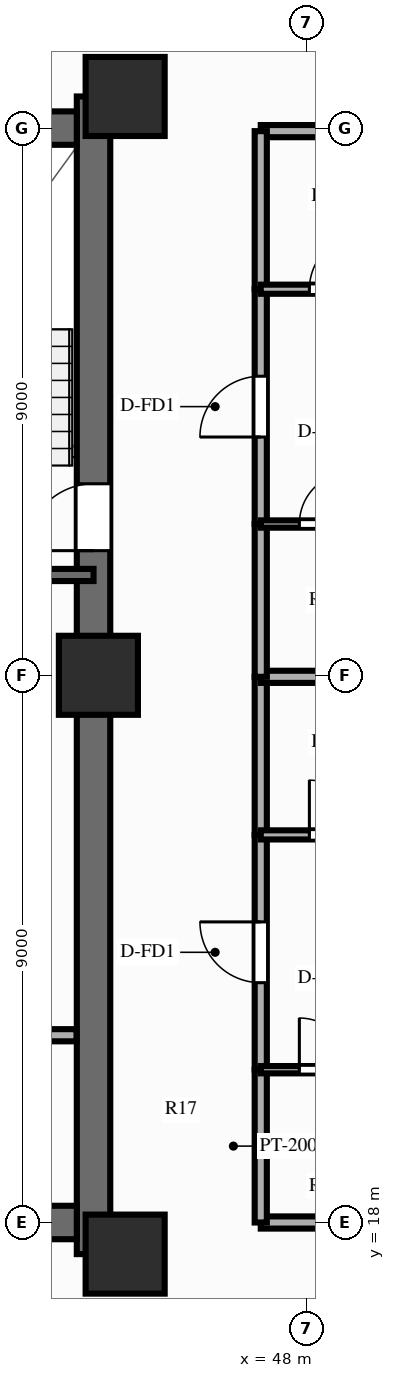
"""IFC4 building model, lengths in metres.
Left out: names, types, materials, properties, quantities, classifications, styles, units other than length and angle.
Written with IfcOpenShell. Run it as: python <this file> out.ifc"""

import sys

from ifc_helpers import new_model, si_unit, direction, frame, frame_2d, origin, origin_2d, place, context, subcontext, project, spatial, rectangle, extrude, source, transform, mapped, element, fill, save


model = new_model("IFC4")
c1 = context("Model", 3, precision=1e-05, world=origin(), true_north=direction((0.0, 1.0)))
c2 = subcontext(c1, "Body", "Model", "MODEL_VIEW")
j1 = project(units=[si_unit("LENGTHUNIT", "METRE"), si_unit("PLANEANGLEUNIT", "RADIAN")], contexts=[c1])
p1 = place(None, origin())
s1 = spatial("IfcSite", under=j1, at=p1, CompositionType="ELEMENT")
p2 = place(p1, origin())
s2 = spatial("IfcBuilding", under=s1, at=p2, CompositionType="ELEMENT")
p3 = place(p2, frame((0.0, 0.0, 89.85)))
s3 = spatial("IfcBuildingStorey", under=s2, at=p3, CompositionType="ELEMENT", Elevation=89.85)
p4 = place(p3, frame((44.5, 17.48, 0.0), z_axis=(0.0, 0.0, 1.0), x_axis=(0.0, 1.0, 0.0)))
e1 = element("IfcWall", 1, at=p4, inside=s3, PredefinedType="SHEAR", context=c2, shape_type="SweptSolid", body=[
    extrude(rectangle(XDim=19.04, YDim=0.55, at=frame_2d((9.52, 0.0))), origin(), (0.0, 0.0, 1.0), 3.0),
])
p5 = place(p4, frame((12.67, 0.0, 0.0), z_axis=(0.0, 0.0, 1.0), x_axis=(-1.0, 0.0, 0.0)))
e2 = element("IfcOpeningElement", 2, at=p5, cuts=e1, PredefinedType="OPENING", context=c2, shape_type="SweptSolid", body=[
    extrude(rectangle(XDim=1.1, YDim=2.15, at=frame_2d((0.55, 1.075))), frame((0.0, 0.287, 0.0), z_axis=(0.0, -1.0, 0.0), x_axis=(1.0, 0.0, 0.0)), (0.0, 0.0, 1.0), 0.574),
])
p6 = place(p3, frame((31.775, 18.0, 0.0), z_axis=(0.0, 0.0, 1.0), x_axis=(1.0, 0.0, 0.0)))
e3 = element("IfcWall", 3, at=p6, inside=s3, PredefinedType="SHEAR", context=c2, shape_type="SweptSolid", body=[
    extrude(rectangle(XDim=12.45, YDim=0.55, at=frame_2d((6.225, 0.0))), origin(), (0.0, 0.0, 1.0), 3.0),
])
p7 = place(p3, frame((31.775, 36.0, 0.0), z_axis=(0.0, 0.0, 1.0), x_axis=(1.0, 0.0, 0.0)))
e4 = element("IfcWall", 4, at=p7, inside=s3, PredefinedType="SHEAR", context=c2, shape_type="SweptSolid", body=[
    extrude(rectangle(XDim=12.45, YDim=0.55, at=frame_2d((6.225, 0.0))), origin(), (0.0, 0.0, 1.0), 3.0),
])
p8 = place(p7, frame((5.175, 0.0, 0.0), z_axis=(0.0, 0.0, 1.0), x_axis=(-1.0, 0.0, 0.0)))
e5 = element("IfcOpeningElement", 5, at=p8, cuts=e4, PredefinedType="OPENING", context=c2, shape_type="SweptSolid", body=[
    extrude(rectangle(XDim=1.4, YDim=2.15, at=frame_2d((0.7, 1.075))), frame((0.0, 0.287, 0.0), z_axis=(0.0, -1.0, 0.0), x_axis=(1.0, 0.0, 0.0)), (0.0, 0.0, 1.0), 0.574),
])
m1 = source(origin(), c2, "Body", "SweptSolid", [
    extrude(rectangle(XDim=1.3, YDim=1.3, at=origin_2d()), origin(), (0.0, 0.0, 1.0), 3.0),
])
for number, where, z_axis, x_axis in (
    (6, (45.02, 17.48, 0.0), (0.0, 0.0, 1.0), (1.0, 0.0, 0.0)),
    (7, (45.02, 36.52, 0.0), (0.0, 0.0, 1.0), (1.0, 0.0, 0.0)),
    (8, (44.58, 27.0, 0.0), (0.0, 0.0, 1.0), (1.0, 0.0, 0.0)),
):
    element("IfcColumn", number, at=place(p3, frame(where, z_axis=z_axis, x_axis=x_axis)), inside=s3, PredefinedType="COLUMN", context=c2, shape_type="MappedRepresentation", body=[
        mapped(m1, transform((0.0, 0.0, 0.0), scale=1.0)),
    ])
p9 = place(p3, frame((42.88, 21.08, 0.0), z_axis=(0.0, 0.0, 1.0), x_axis=(1.0, 0.0, 0.0)))
e9 = element("IfcWall", 9, at=p9, inside=s3, PredefinedType="PARTITIONING", context=c2, shape_type="SweptSolid", body=[
    extrude(rectangle(XDim=1.34, YDim=0.2, at=frame_2d((0.67, 0.0))), origin(), (0.0, 0.0, 1.0), 2.79),
])
p10 = place(p3, frame((40.57, 28.65, 0.0), z_axis=(0.0, 0.0, 1.0), x_axis=(1.0, 0.0, 0.0)))
e10 = element("IfcWall", 10, at=p10, inside=s3, PredefinedType="SOLIDWALL", context=c2, shape_type="SweptSolid", body=[
    extrude(rectangle(XDim=3.93, YDim=0.2, at=frame_2d((1.965, 0.0))), origin(), (0.0, 0.0, 1.0), 2.79),
])
for number, where, z_axis, x_axis in (
    (11, (47.25, 18.0, 0.0), (0.0, 0.0, 1.0), (1.0, 0.0, 0.0)),
    (12, (47.25, 35.95, 0.0), (0.0, 0.0, 1.0), (1.0, 0.0, 0.0)),
):
    element("IfcWall", number, at=place(p3, frame(where, z_axis=z_axis, x_axis=x_axis)), inside=s3, PredefinedType="PARTITIONING", context=c2, shape_type="SweptSolid", body=[
        extrude(rectangle(XDim=16.6, YDim=0.2, at=frame_2d((8.3, 0.0))), origin(), (0.0, 0.0, 1.0), 2.34),
    ])
p11 = place(p3, frame((47.25, 18.0, 0.0), z_axis=(0.0, 0.0, 1.0), x_axis=(0.0, 1.0, 0.0)))
e13 = element("IfcWall", 13, at=p11, inside=s3, PredefinedType="PARTITIONING", context=c2, shape_type="SweptSolid", body=[
    extrude(rectangle(XDim=2.513, YDim=0.2, at=frame_2d((1.256, 0.0))), origin(), (0.0, 0.0, 1.0), 2.79),
])
p12 = place(p3, frame((47.25, 20.513, 0.0), z_axis=(0.0, 0.0, 1.0), x_axis=(0.0, 1.0, 0.0)))
e14 = element("IfcWall", 14, at=p12, inside=s3, PredefinedType="PARTITIONING", context=c2, shape_type="SweptSolid", body=[
    extrude(rectangle(XDim=3.862, YDim=0.2, at=frame_2d((1.931, 0.0))), origin(), (0.0, 0.0, 1.0), 2.79),
])
p13 = place(p12, frame((1.431, 0.0, 0.0)))
e15 = element("IfcOpeningElement", 15, at=p13, cuts=e14, PredefinedType="OPENING", context=c2, shape_type="SweptSolid", body=[
    extrude(rectangle(XDim=1.0, YDim=2.15, at=frame_2d((0.5, 1.075))), frame((0.0, 0.112, 0.0), z_axis=(0.0, -1.0, 0.0), x_axis=(1.0, 0.0, 0.0)), (0.0, 0.0, 1.0), 0.224),
])
p14 = place(p3, frame((47.25, 24.375, 0.0), z_axis=(0.0, 0.0, 1.0), x_axis=(0.0, 1.0, 0.0)))
e16 = element("IfcWall", 16, at=p14, inside=s3, PredefinedType="PARTITIONING", context=c2, shape_type="SweptSolid", body=[
    extrude(rectangle(XDim=2.6, YDim=0.2, at=frame_2d((1.3, 0.0))), origin(), (0.0, 0.0, 1.0), 2.79),
])
p15 = place(p3, frame((47.25, 20.513, 0.0), z_axis=(0.0, 0.0, 1.0), x_axis=(1.0, 0.0, 0.0)))
e17 = element("IfcWall", 17, at=p15, inside=s3, PredefinedType="PARTITIONING", context=c2, shape_type="SweptSolid", body=[
    extrude(rectangle(XDim=2.12, YDim=0.12, at=frame_2d((1.06, 0.0))), origin(), (0.0, 0.0, 1.0), 2.79),
])
p16 = place(p15, frame((0.635, 0.0, 0.0)))
e18 = element("IfcOpeningElement", 18, at=p16, cuts=e17, PredefinedType="OPENING", context=c2, shape_type="SweptSolid", body=[
    extrude(rectangle(XDim=0.85, YDim=2.05, at=frame_2d((0.425, 1.025))), frame((0.0, 0.072, 0.0), z_axis=(0.0, -1.0, 0.0), x_axis=(1.0, 0.0, 0.0)), (0.0, 0.0, 1.0), 0.144),
])
p17 = place(p3, frame((47.25, 24.375, 0.0), z_axis=(0.0, 0.0, 1.0), x_axis=(1.0, 0.0, 0.0)))
e19 = element("IfcWall", 19, at=p17, inside=s3, PredefinedType="PARTITIONING", context=c2, shape_type="SweptSolid", body=[
    extrude(rectangle(XDim=2.5, YDim=0.15, at=frame_2d((1.25, 0.0))), origin(), (0.0, 0.0, 1.0), 2.79),
])
p18 = place(p17, frame((0.8, 0.0, 0.0)))
e20 = element("IfcOpeningElement", 20, at=p18, cuts=e19, PredefinedType="OPENING", context=c2, shape_type="SweptSolid", body=[
    extrude(rectangle(XDim=0.9, YDim=2.1, at=frame_2d((0.45, 1.05))), frame((0.0, 0.087, 0.0), z_axis=(0.0, -1.0, 0.0), x_axis=(1.0, 0.0, 0.0)), (0.0, 0.0, 1.0), 0.174),
])
p19 = place(p3, frame((47.25, 26.975, 0.0), z_axis=(0.0, 0.0, 1.0), x_axis=(1.0, 0.0, 0.0)))
e21 = element("IfcWall", 21, at=p19, inside=s3, PredefinedType="PARTITIONING", context=c2, shape_type="SweptSolid", body=[
    extrude(rectangle(XDim=16.6, YDim=0.2, at=frame_2d((8.3, 0.0))), origin(), (0.0, 0.0, 1.0), 2.79),
])
p20 = place(p3, frame((47.25, 26.975, 0.0), z_axis=(0.0, 0.0, 1.0), x_axis=(0.0, 1.0, 0.0)))
e22 = element("IfcWall", 22, at=p20, inside=s3, PredefinedType="PARTITIONING", context=c2, shape_type="SweptSolid", body=[
    extrude(rectangle(XDim=2.513, YDim=0.2, at=frame_2d((1.256, 0.0))), origin(), (0.0, 0.0, 1.0), 2.79),
])
p21 = place(p3, frame((47.25, 29.488, 0.0), z_axis=(0.0, 0.0, 1.0), x_axis=(0.0, 1.0, 0.0)))
e23 = element("IfcWall", 23, at=p21, inside=s3, PredefinedType="PARTITIONING", context=c2, shape_type="SweptSolid", body=[
    extrude(rectangle(XDim=3.862, YDim=0.2, at=frame_2d((1.931, 0.0))), origin(), (0.0, 0.0, 1.0), 2.79),
])
p22 = place(p21, frame((1.431, 0.0, 0.0)))
e24 = element("IfcOpeningElement", 24, at=p22, cuts=e23, PredefinedType="OPENING", context=c2, shape_type="SweptSolid", body=[
    extrude(rectangle(XDim=1.0, YDim=2.15, at=frame_2d((0.5, 1.075))), frame((0.0, 0.112, 0.0), z_axis=(0.0, -1.0, 0.0), x_axis=(1.0, 0.0, 0.0)), (0.0, 0.0, 1.0), 0.224),
])
p23 = place(p3, frame((47.25, 33.35, 0.0), z_axis=(0.0, 0.0, 1.0), x_axis=(0.0, 1.0, 0.0)))
e25 = element("IfcWall", 25, at=p23, inside=s3, PredefinedType="PARTITIONING", context=c2, shape_type="SweptSolid", body=[
    extrude(rectangle(XDim=2.6, YDim=0.2, at=frame_2d((1.3, 0.0))), origin(), (0.0, 0.0, 1.0), 2.79),
])
p24 = place(p3, frame((47.25, 29.488, 0.0), z_axis=(0.0, 0.0, 1.0), x_axis=(1.0, 0.0, 0.0)))
e26 = element("IfcWall", 26, at=p24, inside=s3, PredefinedType="PARTITIONING", context=c2, shape_type="SweptSolid", body=[
    extrude(rectangle(XDim=2.12, YDim=0.12, at=frame_2d((1.06, 0.0))), origin(), (0.0, 0.0, 1.0), 2.79),
])
p25 = place(p24, frame((0.635, 0.0, 0.0)))
e27 = element("IfcOpeningElement", 27, at=p25, cuts=e26, PredefinedType="OPENING", context=c2, shape_type="SweptSolid", body=[
    extrude(rectangle(XDim=0.85, YDim=2.05, at=frame_2d((0.425, 1.025))), frame((0.0, 0.072, 0.0), z_axis=(0.0, -1.0, 0.0), x_axis=(1.0, 0.0, 0.0)), (0.0, 0.0, 1.0), 0.144),
])
p26 = place(p3, frame((47.25, 33.35, 0.0), z_axis=(0.0, 0.0, 1.0), x_axis=(1.0, 0.0, 0.0)))
e28 = element("IfcWall", 28, at=p26, inside=s3, PredefinedType="PARTITIONING", context=c2, shape_type="SweptSolid", body=[
    extrude(rectangle(XDim=2.5, YDim=0.15, at=frame_2d((1.25, 0.0))), origin(), (0.0, 0.0, 1.0), 2.79),
])
p27 = place(p26, frame((0.8, 0.0, 0.0)))
e29 = element("IfcOpeningElement", 29, at=p27, cuts=e28, PredefinedType="OPENING", context=c2, shape_type="SweptSolid", body=[
    extrude(rectangle(XDim=0.9, YDim=2.1, at=frame_2d((0.45, 1.05))), frame((0.0, 0.087, 0.0), z_axis=(0.0, -1.0, 0.0), x_axis=(1.0, 0.0, 0.0)), (0.0, 0.0, 1.0), 0.174),
])
m2 = source(origin(), c2, "Body", "SweptSolid", [
    extrude(rectangle(XDim=1.1, YDim=2.15, at=frame_2d((0.55, 1.075))), frame((0.0, 0.025, 0.0), z_axis=(0.0, -1.0, 0.0), x_axis=(1.0, 0.0, 0.0)), (0.0, 0.0, 1.0), 0.05),
])
p28 = place(p5, origin())
e30 = element("IfcDoor", 30, at=p28, inside=s3, OperationType="SINGLE_SWING_RIGHT", PredefinedType="DOOR", context=c2, shape_type="MappedRepresentation", body=[
    mapped(m2, transform((0.0, 0.0, 0.0), scale=1.0)),
])
fill(e2, e30)
m3 = source(origin(), c2, "Body", "SweptSolid", [
    extrude(rectangle(XDim=1.0, YDim=2.15, at=frame_2d((0.5, 1.075))), frame((0.0, 0.025, 0.0), z_axis=(0.0, -1.0, 0.0), x_axis=(1.0, 0.0, 0.0)), (0.0, 0.0, 1.0), 0.05),
])
p29 = place(p13, origin())
e31 = element("IfcDoor", 31, at=p29, inside=s3, OperationType="SINGLE_SWING_RIGHT", PredefinedType="DOOR", context=c2, shape_type="MappedRepresentation", body=[
    mapped(m3, transform((0.0, 0.0, 0.0), scale=1.0)),
])
fill(e15, e31)
m4 = source(origin(), c2, "Body", "SweptSolid", [
    extrude(rectangle(XDim=0.85, YDim=2.05, at=frame_2d((0.425, 1.025))), frame((0.0, 0.025, 0.0), z_axis=(0.0, -1.0, 0.0), x_axis=(1.0, 0.0, 0.0)), (0.0, 0.0, 1.0), 0.05),
])
p30 = place(p16, origin())
e32 = element("IfcDoor", 32, at=p30, inside=s3, OperationType="SINGLE_SWING_LEFT", PredefinedType="DOOR", context=c2, shape_type="MappedRepresentation", body=[
    mapped(m4, transform((0.0, 0.0, 0.0), scale=1.0)),
])
fill(e18, e32)
m5 = source(origin(), c2, "Body", "SweptSolid", [
    extrude(rectangle(XDim=0.9, YDim=2.1, at=frame_2d((0.45, 1.05))), frame((0.0, 0.025, 0.0), z_axis=(0.0, -1.0, 0.0), x_axis=(1.0, 0.0, 0.0)), (0.0, 0.0, 1.0), 0.05),
])
p31 = place(p18, origin())
e33 = element("IfcDoor", 33, at=p31, inside=s3, OperationType="SINGLE_SWING_LEFT", PredefinedType="DOOR", context=c2, shape_type="MappedRepresentation", body=[
    mapped(m5, transform((0.0, 0.0, 0.0), scale=1.0)),
])
fill(e20, e33)
p32 = place(p22, origin())
e34 = element("IfcDoor", 34, at=p32, inside=s3, OperationType="SINGLE_SWING_LEFT", PredefinedType="DOOR", context=c2, shape_type="MappedRepresentation", body=[
    mapped(m3, transform((0.0, 0.0, 0.0), scale=1.0)),
])
fill(e24, e34)
p33 = place(p25, origin())
e35 = element("IfcDoor", 35, at=p33, inside=s3, OperationType="SINGLE_SWING_RIGHT", PredefinedType="DOOR", context=c2, shape_type="MappedRepresentation", body=[
    mapped(m4, transform((0.0, 0.0, 0.0), scale=1.0)),
])
fill(e27, e35)
p34 = place(p27, origin())
e36 = element("IfcDoor", 36, at=p34, inside=s3, OperationType="SINGLE_SWING_RIGHT", PredefinedType="DOOR", context=c2, shape_type="MappedRepresentation", body=[
    mapped(m5, transform((0.0, 0.0, 0.0), scale=1.0)),
])
fill(e29, e36)
save(model, sys.argv[1])
